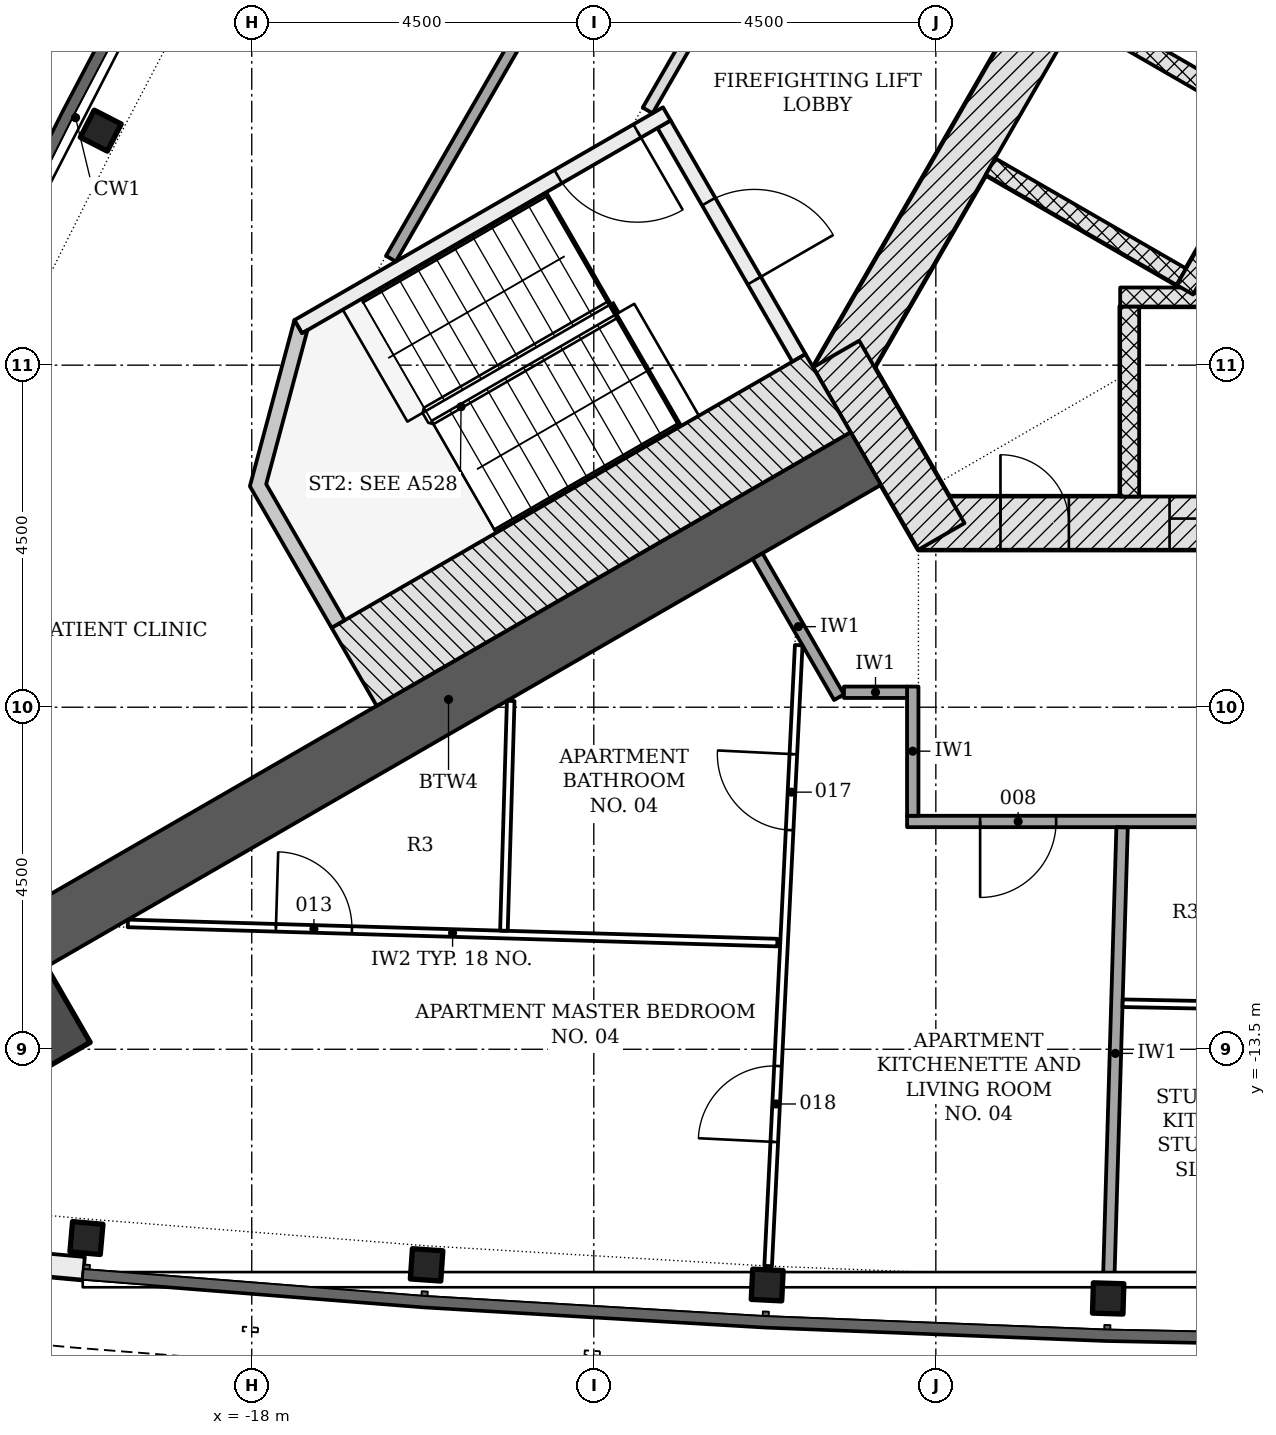
"""IFC4 building model, lengths in metres.
Left out: names, types, materials, properties, quantities, classifications, styles, units other than length and angle.
Written with IfcOpenShell. Run it as: python <this file> out.ifc"""

import sys

from ifc_helpers import new_model, si_unit, direction, frame, frame_2d, origin, origin_2d, place, context, subcontext, project, spatial, polyline, rectangle, i_section, outline, extrude, element, fill, save


model = new_model("IFC4")
c1 = context("Model", 3, precision=1e-05, world=origin(), true_north=direction((0.0, 1.0)))
c2 = subcontext(c1, "Body", "Model", "MODEL_VIEW")
j1 = project(units=[si_unit("LENGTHUNIT", "METRE"), si_unit("PLANEANGLEUNIT", "RADIAN")], contexts=[c1])
p1 = place(None, origin())
s1 = spatial("IfcSite", under=j1, at=p1, CompositionType="ELEMENT")
p2 = place(p1, origin())
s2 = spatial("IfcBuilding", under=s1, at=p2, CompositionType="ELEMENT")
p3 = place(p2, frame((0.0, 0.0, 91.5)))
s3 = spatial("IfcBuildingStorey", under=s2, at=p3, CompositionType="ELEMENT", Elevation=91.5)
p4 = place(p3, frame((-9.229, -6.578, -0.2), z_axis=(0.0, 0.0, 1.0), x_axis=(1.0, 0.0, 0.0)))
e1 = element("IfcWall", 1, at=p4, inside=s3, PredefinedType="SHEAR", context=c2, shape_type="SweptSolid", body=[
    extrude(rectangle(XDim=18.458, YDim=0.7, at=frame_2d((9.229, 0.0))), origin(), (0.0, 0.0, 1.0), 3.6),
])
p5 = place(p4, frame((3.304, 0.0, 0.2)))
e2 = element("IfcOpeningElement", 2, at=p5, cuts=e1, PredefinedType="OPENING", context=c2, shape_type="SweptSolid", body=[
    extrude(rectangle(XDim=1.1, YDim=2.1, at=frame_2d((0.55, 1.05))), frame((0.0, 0.36, 0.0), z_axis=(0.0, -1.0, 0.0), x_axis=(1.0, 0.0, 0.0)), (0.0, 0.0, 1.0), 0.72),
])
p6 = place(p4, frame((5.454, 0.0, 0.2)))
e3 = element("IfcOpeningElement", 3, at=p6, cuts=e1, PredefinedType="OPENING", context=c2, shape_type="SweptSolid", body=[
    extrude(rectangle(XDim=1.1, YDim=2.1, at=frame_2d((0.55, 1.05))), frame((0.0, 0.36, 0.0), z_axis=(0.0, -1.0, 0.0), x_axis=(1.0, 0.0, 0.0)), (0.0, 0.0, 1.0), 0.72),
])
p7 = place(p4, frame((7.604, 0.0, 0.2)))
e4 = element("IfcOpeningElement", 4, at=p7, cuts=e1, PredefinedType="OPENING", context=c2, shape_type="SweptSolid", body=[
    extrude(rectangle(XDim=1.1, YDim=2.1, at=frame_2d((0.55, 1.05))), frame((0.0, 0.36, 0.0), z_axis=(0.0, -1.0, 0.0), x_axis=(1.0, 0.0, 0.0)), (0.0, 0.0, 1.0), 0.72),
])
p8 = place(p4, frame((9.754, 0.0, 0.2)))
e5 = element("IfcOpeningElement", 5, at=p8, cuts=e1, PredefinedType="OPENING", context=c2, shape_type="SweptSolid", body=[
    extrude(rectangle(XDim=1.1, YDim=2.1, at=frame_2d((0.55, 1.05))), frame((0.0, 0.36, 0.0), z_axis=(0.0, -1.0, 0.0), x_axis=(1.0, 0.0, 0.0)), (0.0, 0.0, 1.0), 0.72),
])
p9 = place(p4, frame((11.904, 0.0, 0.2)))
e6 = element("IfcOpeningElement", 6, at=p9, cuts=e1, PredefinedType="OPENING", context=c2, shape_type="SweptSolid", body=[
    extrude(rectangle(XDim=1.1, YDim=2.1, at=frame_2d((0.55, 1.05))), frame((0.0, 0.36, 0.0), z_axis=(0.0, -1.0, 0.0), x_axis=(1.0, 0.0, 0.0)), (0.0, 0.0, 1.0), 0.72),
])
p10 = place(p4, frame((14.054, 0.0, 0.2)))
e7 = element("IfcOpeningElement", 7, at=p10, cuts=e1, PredefinedType="OPENING", context=c2, shape_type="SweptSolid", body=[
    extrude(rectangle(XDim=1.1, YDim=2.1, at=frame_2d((0.55, 1.05))), frame((0.0, 0.36, 0.0), z_axis=(0.0, -1.0, 0.0), x_axis=(1.0, 0.0, 0.0)), (0.0, 0.0, 1.0), 0.72),
])
p11 = place(p4, frame((1.079, 0.0, 0.2)))
e8 = element("IfcOpeningElement", 8, at=p11, cuts=e1, PredefinedType="OPENING", context=c2, shape_type="SweptSolid", body=[
    extrude(rectangle(XDim=0.9, YDim=2.1, at=frame_2d((0.45, 1.05))), frame((0.0, 0.36, 0.0), z_axis=(0.0, -1.0, 0.0), x_axis=(1.0, 0.0, 0.0)), (0.0, 0.0, 1.0), 0.72),
])
p12 = place(p3, frame((-1.083, 11.281, -0.2), z_axis=(0.0, 0.0, 1.0), x_axis=(-0.500001446645, -0.866024568562, 0.0)))
e9 = element("IfcWall", 9, at=p12, inside=s3, PredefinedType="SHEAR", context=c2, shape_type="SweptSolid", body=[
    extrude(rectangle(XDim=18.458, YDim=0.7, at=frame_2d((9.229, 0.0))), origin(), (0.0, 0.0, 1.0), 3.6),
])
p13 = place(p12, frame((8.979, 0.0, 0.2)))
e10 = element("IfcOpeningElement", 10, at=p13, cuts=e9, PredefinedType="OPENING", context=c2, shape_type="SweptSolid", body=[
    extrude(rectangle(XDim=1.2, YDim=2.1, at=frame_2d((0.6, 1.05))), frame((0.0, 0.36, 0.0), z_axis=(0.0, -1.0, 0.0), x_axis=(1.0, 0.0, 0.0)), (0.0, 0.0, 1.0), 0.72),
])
p14 = place(p12, frame((11.029, 0.0, 0.2)))
e11 = element("IfcOpeningElement", 11, at=p14, cuts=e9, PredefinedType="OPENING", context=c2, shape_type="SweptSolid", body=[
    extrude(rectangle(XDim=1.2, YDim=2.1, at=frame_2d((0.6, 1.05))), frame((0.0, 0.36, 0.0), z_axis=(0.0, -1.0, 0.0), x_axis=(1.0, 0.0, 0.0)), (0.0, 0.0, 1.0), 0.72),
])
p15 = place(p3, frame((-10.311, -4.353, -0.2), z_axis=(0.0, 0.0, 1.0), x_axis=(0.500042739161, -0.866000726912, 0.0)))
e12 = element("IfcWall", 12, at=p15, inside=s3, PredefinedType="SHEAR", context=c2, shape_type="SweptSolid", body=[
    extrude(rectangle(XDim=2.771, YDim=0.7, at=frame_2d((1.386, 0.0))), origin(), (0.0, 0.0, 1.0), 3.6),
])
p16 = place(p3, frame((-9.922, -5.728, -0.2), z_axis=(0.0, 0.0, 1.0), x_axis=(-0.866029086277, -0.499993621681, 0.0)))
e13 = element("IfcWall", 13, at=p16, inside=s3, PredefinedType="SHEAR", context=c2, shape_type="SweptSolid", body=[
    extrude(rectangle(XDim=12.677, YDim=0.8, at=frame_2d((6.339, 0.0))), origin(), (0.0, 0.0, 1.0), 3.6),
])
p17 = place(p3, frame((-22.243, -12.842, -0.2), z_axis=(0.0, 0.0, 1.0), x_axis=(-0.866025403784, -0.5, 0.0)))
e14 = element("IfcColumn", 14, at=p17, inside=s3, PredefinedType="COLUMN", context=c2, shape_type="SweptSolid", body=[
    extrude(rectangle(XDim=3.1, YDim=3.1, at=origin_2d()), origin(), (0.0, 0.0, 1.0), 3.6),
])
for number, where, z_axis, x_axis in (
    (15, (-19.986, -1.415, -0.2), (0.0, 0.0, 1.0), (-0.457, -0.89, 0.0)),
    (16, (-20.175, -15.983, -0.2), (0.0, 0.0, 1.0), (0.996, -0.088, 0.0)),
    (17, (-15.7, -16.336, -0.2), (0.0, 0.0, 1.0), (0.998, -0.069, 0.0)),
    (18, (-11.219, -16.601, -0.2), (0.0, 0.0, 1.0), (0.999, -0.049, 0.0)),
    (19, (-6.733, -16.778, -0.2), (0.0, 0.0, 1.0), (1.0, -0.03, 0.0)),
):
    element("IfcColumn", number, at=place(p3, frame(where, z_axis=z_axis, x_axis=x_axis)), inside=s3, PredefinedType="COLUMN", context=c2, shape_type="SweptSolid", body=[
        extrude(i_section(OverallWidth=0.401, OverallDepth=0.399, WebThickness=0.025, FlangeThickness=0.04, FilletRadius=0.015, at=origin_2d()), origin(), (0.0, 0.0, 1.0), 3.6),
    ])
p18 = place(p3, origin())
e20 = element("IfcWall", 20, at=p18, inside=s3, PredefinedType="NOTDEFINED", context=c2, shape_type="SweptSolid", body=[
    extrude(outline(polyline([(-24.428, -9.249), (-25.03, -10.553), (-25.4, -12.077), (-25.177, -13.63), (-24.392, -14.989), (-23.159, -15.958), (-21.654, -16.4), (-20.224, -16.531), (-20.196, -16.232), (-21.597, -16.104), (-23.019, -15.687), (-24.161, -14.789), (-24.888, -13.53), (-25.094, -12.092), (-24.745, -10.652), (-24.156, -9.374), (-24.428, -9.249)])), origin(), (0.0, 0.0, 1.0), 3.3),
])
p19 = place(p3, frame((-6.45, -6.228, -0.2), z_axis=(0.0, 0.0, 1.0), x_axis=(0.0, 1.0, 0.0)))
e21 = element("IfcWall", 21, at=p19, inside=s3, PredefinedType="PARTITIONING", context=c2, shape_type="SweptSolid", body=[
    extrude(rectangle(XDim=2.5, YDim=0.25, at=frame_2d((1.25, 0.0))), origin(), (0.0, 0.0, 1.0), 3.6),
])
p20 = place(p3, frame((-6.575, -3.603, 0.0), z_axis=(0.0, 0.0, 1.0), x_axis=(1.0, 0.0, 0.0)))
e22 = element("IfcWall", 22, at=p20, inside=s3, PredefinedType="PARTITIONING", context=c2, shape_type="SweptSolid", body=[
    extrude(rectangle(XDim=13.15, YDim=0.25, at=frame_2d((6.575, 0.0))), origin(), (0.0, 0.0, 1.0), 3.4),
])
for number, where, z_axis, x_axis in (
    (23, (-7.106, 0.148, -0.2), (0.0, 0.0, 1.0), (0.866, -0.5, 0.0)),
    (24, (-8.281, -1.887, -0.2), (0.0, 0.0, 1.0), (0.866, -0.5, 0.0)),
):
    element("IfcWall", number, at=place(p3, frame(where, z_axis=z_axis, x_axis=x_axis)), inside=s3, PredefinedType="PARTITIONING", context=c2, shape_type="SweptSolid", body=[
        extrude(rectangle(XDim=2.9, YDim=0.25, at=frame_2d((1.45, 0.0))), origin(), (0.0, 0.0, 1.0), 3.6),
    ])
p21 = place(p3, frame((0.176, 6.711, 0.0), z_axis=(0.0, 0.0, 1.0), x_axis=(-0.500004227369, -0.866022963098, 0.0)))
e25 = element("IfcWall", 25, at=p21, inside=s3, PredefinedType="PARTITIONING", context=c2, shape_type="SweptSolid", body=[
    extrude(rectangle(XDim=11.8, YDim=0.25, at=frame_2d((5.9, 0.0))), origin(), (0.0, 0.0, 1.0), 3.4),
])
p22 = place(p3, frame((-12.576, -1.331, -0.2), z_axis=(0.0, 0.0, 1.0), x_axis=(0.499970499736, -0.8660424351, 0.0)))
e26 = element("IfcWall", 26, at=p22, inside=s3, PredefinedType="SHEAR", context=c2, shape_type="SweptSolid", body=[
    extrude(rectangle(XDim=3.55, YDim=0.2, at=frame_2d((1.775, 0.0))), origin(), (0.0, 0.0, 1.0), 3.6),
])
p23 = place(p22, frame((1.175, 0.0, 0.2)))
e27 = element("IfcOpeningElement", 27, at=p23, cuts=e26, PredefinedType="OPENING", context=c2, shape_type="SweptSolid", body=[
    extrude(rectangle(XDim=1.2, YDim=2.1, at=frame_2d((0.6, 1.05))), frame((0.0, 0.11, 0.0), z_axis=(0.0, -1.0, 0.0), x_axis=(1.0, 0.0, 0.0)), (0.0, 0.0, 1.0), 0.22),
])
p24 = place(p3, frame((-12.539, -1.194, -0.2), z_axis=(0.0, 0.0, 1.0), x_axis=(-0.866045472092, -0.499965239061, 0.0)))
e28 = element("IfcWall", 28, at=p24, inside=s3, PredefinedType="SHEAR", context=c2, shape_type="SweptSolid", body=[
    extrude(rectangle(XDim=5.6, YDim=0.2, at=frame_2d((2.8, 0.0))), origin(), (0.0, 0.0, 1.0), 3.6),
])
p25 = place(p24, frame((0.45, 0.0, 0.2)))
e29 = element("IfcOpeningElement", 29, at=p25, cuts=e28, PredefinedType="OPENING", context=c2, shape_type="SweptSolid", body=[
    extrude(rectangle(XDim=1.2, YDim=2.1, at=frame_2d((0.6, 1.05))), frame((0.0, 0.11, 0.0), z_axis=(0.0, -1.0, 0.0), x_axis=(1.0, 0.0, 0.0)), (0.0, 0.0, 1.0), 0.22),
])
p26 = place(p3, frame((-10.418, -4.868, -0.2), z_axis=(0.0, 0.0, 1.0), x_axis=(-0.866018442252, -0.500012057535, 0.0)))
e30 = element("IfcWall", 30, at=p26, inside=s3, PredefinedType="SHEAR", context=c2, shape_type="SweptSolid", body=[
    extrude(rectangle(XDim=7.2, YDim=1.186, at=frame_2d((3.6, 0.0))), origin(), (0.0, 0.0, 1.0), 3.6),
])
p27 = place(p3, frame((0.0, 0.0, -0.2)))
e31 = element("IfcWall", 31, at=p27, inside=s3, PredefinedType="SHEAR", context=c2, shape_type="SweptSolid", body=[
    extrude(outline(polyline([(-17.439, -3.907), (-18.025, -6.093), (-16.95, -7.955), (-16.777, -7.855), (-17.81, -6.065), (-17.267, -4.039), (-17.339, -4.081), (-17.339, -4.081), (-17.339, -4.081), (-17.339, -4.081), (-17.339, -4.081), (-17.339, -4.081), (-17.339, -4.081), (-17.339, -4.081), (-17.339, -4.081), (-17.339, -4.081), (-17.339, -4.081), (-17.339, -4.081), (-17.339, -4.081), (-17.339, -4.081), (-17.339, -4.081), (-17.339, -4.081), (-17.339, -4.081), (-17.439, -3.907)])), origin(), (0.0, 0.0, 1.0), 3.6),
])
p28 = place(p3, frame((-16.169, -3.099, 0.0), z_axis=(0.0, 0.0, 1.0), x_axis=(0.499999805269, 0.866025516212, 0.0)))
e32 = element("IfcWall", 32, at=p28, inside=s3, PredefinedType="PARTITIONING", context=c2, shape_type="SweptSolid", body=[
    extrude(rectangle(XDim=22.097, YDim=0.15, at=frame_2d((11.049, 0.0))), origin(), (0.0, 0.0, 1.0), 2.778),
])
p29 = place(p28, frame((12.221, 0.0, 0.0)))
e33 = element("IfcOpeningElement", 33, at=p29, cuts=e32, PredefinedType="OPENING", context=c2, shape_type="SweptSolid", body=[
    extrude(rectangle(XDim=1.5, YDim=2.1, at=frame_2d((0.75, 1.05))), frame((0.0, 0.085, 0.0), z_axis=(0.0, -1.0, 0.0), x_axis=(1.0, 0.0, 0.0)), (0.0, 0.0, 1.0), 0.17),
])
p30 = place(p28, frame((3.403, 0.0, 0.0)))
e34 = element("IfcOpeningElement", 34, at=p30, cuts=e32, PredefinedType="OPENING", context=c2, shape_type="SweptSolid", body=[
    extrude(rectangle(XDim=1.5, YDim=2.1, at=frame_2d((0.75, 1.05))), frame((0.0, 0.085, 0.0), z_axis=(0.0, -1.0, 0.0), x_axis=(1.0, 0.0, 0.0)), (0.0, 0.0, 1.0), 0.17),
])
p31 = place(p3, frame((-4.407, 13.374, 0.0), z_axis=(0.0, 0.0, 1.0), x_axis=(-0.499997181693, -0.866027030928, 0.0)))
e35 = element("IfcWall", 35, at=p31, inside=s3, PredefinedType="PARTITIONING", context=c2, shape_type="SweptSolid", body=[
    extrude(rectangle(XDim=16.77, YDim=0.15, at=frame_2d((8.385, 0.0))), origin(), (0.0, 0.0, 1.0), 2.778),
])
p32 = place(p31, frame((8.879, 0.0, 0.0)))
e36 = element("IfcOpeningElement", 36, at=p32, cuts=e35, PredefinedType="OPENING", context=c2, shape_type="SweptSolid", body=[
    extrude(rectangle(XDim=1.0, YDim=2.1, at=frame_2d((0.5, 1.05))), frame((0.0, 0.085, 0.0), z_axis=(0.0, -1.0, 0.0), x_axis=(1.0, 0.0, 0.0)), (0.0, 0.0, 1.0), 0.17),
])
p33 = place(p3, frame((3.689, -10.503, 0.0), z_axis=(0.0, 0.0, 1.0), x_axis=(-1.0, 0.0, 0.0)))
e37 = element("IfcWall", 37, at=p33, inside=s3, PredefinedType="PARTITIONING", context=c2, shape_type="SweptSolid", body=[
    extrude(rectangle(XDim=13.068, YDim=0.15, at=frame_2d((6.534, 0.0))), origin(), (0.0, 0.0, 1.0), 2.778),
])
p34 = place(p33, frame((11.106, 0.0, 0.0)))
e38 = element("IfcOpeningElement", 38, at=p34, cuts=e37, PredefinedType="OPENING", context=c2, shape_type="SweptSolid", body=[
    extrude(rectangle(XDim=1.0, YDim=2.1, at=frame_2d((0.5, 1.05))), frame((0.0, 0.085, 0.0), z_axis=(0.0, -1.0, 0.0), x_axis=(1.0, 0.0, 0.0)), (0.0, 0.0, 1.0), 0.17),
])
p35 = place(p33, frame((6.359, 0.0, 0.0)))
e39 = element("IfcOpeningElement", 39, at=p35, cuts=e37, PredefinedType="OPENING", context=c2, shape_type="SweptSolid", body=[
    extrude(rectangle(XDim=1.0, YDim=2.1, at=frame_2d((0.5, 1.05))), frame((0.0, 0.085, 0.0), z_axis=(0.0, -1.0, 0.0), x_axis=(1.0, 0.0, 0.0)), (0.0, 0.0, 1.0), 0.17),
])
p36 = place(p33, frame((2.501, 0.0, 0.0)))
e40 = element("IfcOpeningElement", 40, at=p36, cuts=e37, PredefinedType="OPENING", context=c2, shape_type="SweptSolid", body=[
    extrude(rectangle(XDim=1.0, YDim=2.1, at=frame_2d((0.5, 1.05))), frame((0.0, 0.085, 0.0), z_axis=(0.0, -1.0, 0.0), x_axis=(1.0, 0.0, 0.0)), (0.0, 0.0, 1.0), 0.17),
])
p37 = place(p3, frame((-11.345, -7.012, 0.0), z_axis=(0.0, 0.0, 1.0), x_axis=(0.499998569178, -0.866026229868, 0.0)))
e41 = element("IfcWall", 41, at=p37, inside=s3, PredefinedType="PARTITIONING", context=c2, shape_type="SweptSolid", body=[
    extrude(rectangle(XDim=2.143, YDim=0.15, at=frame_2d((1.072, 0.0))), origin(), (0.0, 0.0, 1.0), 2.778),
])
p38 = place(p3, frame((-9.304, -10.428, 0.0), z_axis=(0.0, 0.0, 1.0), x_axis=(0.0, 1.0, 0.0)))
e42 = element("IfcWall", 42, at=p38, inside=s3, PredefinedType="PARTITIONING", context=c2, shape_type="SweptSolid", body=[
    extrude(rectangle(XDim=1.7, YDim=0.15, at=frame_2d((0.85, 0.0))), origin(), (0.0, 0.0, 1.0), 3.4),
])
p39 = place(p3, frame((-10.209, -8.803, 0.0), z_axis=(0.0, 0.0, 1.0), x_axis=(1.0, 0.0, 0.0)))
e43 = element("IfcWall", 43, at=p39, inside=s3, PredefinedType="PARTITIONING", context=c2, shape_type="SweptSolid", body=[
    extrude(rectangle(XDim=0.83, YDim=0.15, at=frame_2d((0.415, 0.0))), origin(), (0.0, 0.0, 1.0), 3.4),
])
p40 = place(p3, frame((-6.725, -16.528, 0.0), z_axis=(0.0, 0.0, 1.0), x_axis=(0.029499121441, 0.99956480622, 0.0)))
e44 = element("IfcWall", 44, at=p40, inside=s3, PredefinedType="PARTITIONING", context=c2, shape_type="SweptSolid", body=[
    extrude(rectangle(XDim=5.951, YDim=0.15, at=frame_2d((2.975, 0.0))), origin(), (0.0, 0.0, 1.0), 2.778),
])
p41 = place(p3, frame((-19.63, -11.844, 0.0), z_axis=(0.0, 0.0, 1.0), x_axis=(0.999564712957, -0.02950228145, 0.0)))
e45 = element("IfcWall", 45, at=p41, inside=s3, PredefinedType="PARTITIONING", context=c2, shape_type="SweptSolid", body=[
    extrude(rectangle(XDim=8.548, YDim=0.1, at=frame_2d((4.274, 0.0))), origin(), (0.0, 0.0, 1.0), 2.778),
])
p42 = place(p41, frame((1.949, 0.0, 0.0)))
e46 = element("IfcOpeningElement", 46, at=p42, cuts=e45, PredefinedType="OPENING", context=c2, shape_type="SweptSolid", body=[
    extrude(rectangle(XDim=1.0, YDim=2.1, at=frame_2d((0.5, 1.05))), frame((0.0, 0.06, 0.0), z_axis=(0.0, -1.0, 0.0), x_axis=(1.0, 0.0, 0.0)), (0.0, 0.0, 1.0), 0.12),
])
p43 = place(p3, frame((-11.206, -16.352, 0.0), z_axis=(0.0, 0.0, 1.0), x_axis=(0.049170759729, 0.998790386612, 0.0)))
e47 = element("IfcWall", 47, at=p43, inside=s3, PredefinedType="PARTITIONING", context=c2, shape_type="SweptSolid", body=[
    extrude(rectangle(XDim=8.178, YDim=0.1, at=frame_2d((4.089, 0.0))), origin(), (0.0, 0.0, 1.0), 2.778),
])
p44 = place(p43, frame((5.742, 0.0, 0.0)))
e48 = element("IfcOpeningElement", 48, at=p44, cuts=e47, PredefinedType="OPENING", context=c2, shape_type="SweptSolid", body=[
    extrude(rectangle(XDim=1.0, YDim=2.1, at=frame_2d((0.5, 1.05))), frame((0.0, 0.06, 0.0), z_axis=(0.0, -1.0, 0.0), x_axis=(1.0, 0.0, 0.0)), (0.0, 0.0, 1.0), 0.12),
])
p45 = place(p43, frame((1.635, 0.0, 0.0)))
e49 = element("IfcOpeningElement", 49, at=p45, cuts=e47, PredefinedType="OPENING", context=c2, shape_type="SweptSolid", body=[
    extrude(rectangle(XDim=1.0, YDim=2.1, at=frame_2d((0.5, 1.05))), frame((0.0, 0.06, 0.0), z_axis=(0.0, -1.0, 0.0), x_axis=(1.0, 0.0, 0.0)), (0.0, 0.0, 1.0), 0.12),
])
p46 = place(p3, frame((-14.682, -11.94, 0.0), z_axis=(0.0, 0.0, 1.0), x_axis=(0.029546132361, 0.999563417729, 0.0)))
e50 = element("IfcWall", 50, at=p46, inside=s3, PredefinedType="PARTITIONING", context=c2, shape_type="SweptSolid", body=[
    extrude(rectangle(XDim=3.024, YDim=0.1, at=frame_2d((1.512, 0.0))), origin(), (0.0, 0.0, 1.0), 3.4),
])
p47 = place(p3, frame((-6.542, -12.894, 0.0), z_axis=(0.0, 0.0, 1.0), x_axis=(0.999805392652, -0.019727565082, 0.0)))
e51 = element("IfcWall", 51, at=p47, inside=s3, PredefinedType="PARTITIONING", context=c2, shape_type="SweptSolid", body=[
    extrude(rectangle(XDim=2.364, YDim=0.1, at=frame_2d((1.182, 0.0))), origin(), (0.0, 0.0, 1.0), 2.778),
])
p48 = place(p5, origin())
e52 = element("IfcDoor", 52, at=p48, inside=s3, OperationType="DOUBLE_DOOR_SLIDING", PredefinedType="DOOR", context=c2, shape_type="SweptSolid", body=[
    extrude(rectangle(XDim=1.1, YDim=2.1, at=frame_2d((0.55, 1.05))), frame((0.0, 0.025, 0.0), z_axis=(0.0, -1.0, 0.0), x_axis=(1.0, 0.0, 0.0)), (0.0, 0.0, 1.0), 0.05),
])
fill(e2, e52)
p49 = place(p11, origin())
e53 = element("IfcDoor", 53, at=p49, inside=s3, OperationType="SINGLE_SWING_LEFT", PredefinedType="DOOR", context=c2, shape_type="SweptSolid", body=[
    extrude(rectangle(XDim=0.9, YDim=2.1, at=frame_2d((0.45, 1.05))), frame((0.0, 0.075, 0.0), z_axis=(0.0, -1.0, 0.0), x_axis=(1.0, 0.0, 0.0)), (0.0, 0.0, 1.0), 0.15),
])
fill(e8, e53)
p50 = place(p23, origin())
e54 = element("IfcDoor", 54, at=p50, inside=s3, OperationType="SINGLE_SWING_RIGHT", PredefinedType="DOOR", context=c2, shape_type="SweptSolid", body=[
    extrude(rectangle(XDim=1.2, YDim=2.1, at=frame_2d((0.6, 1.05))), frame((0.0, 0.025, 0.0), z_axis=(0.0, -1.0, 0.0), x_axis=(1.0, 0.0, 0.0)), (0.0, 0.0, 1.0), 0.05),
])
fill(e27, e54)
p51 = place(p25, origin())
e55 = element("IfcDoor", 55, at=p51, inside=s3, OperationType="SINGLE_SWING_LEFT", PredefinedType="DOOR", context=c2, shape_type="SweptSolid", body=[
    extrude(rectangle(XDim=1.2, YDim=2.1, at=frame_2d((0.6, 1.05))), frame((0.0, 0.025, 0.0), z_axis=(0.0, -1.0, 0.0), x_axis=(1.0, 0.0, 0.0)), (0.0, 0.0, 1.0), 0.05),
])
fill(e29, e55)
p52 = place(p34, origin())
e56 = element("IfcDoor", 56, at=p52, inside=s3, OperationType="SINGLE_SWING_RIGHT", PredefinedType="DOOR", context=c2, shape_type="SweptSolid", body=[
    extrude(rectangle(XDim=1.0, YDim=2.1, at=frame_2d((0.5, 1.05))), frame((0.0, 0.025, 0.0), z_axis=(0.0, -1.0, 0.0), x_axis=(1.0, 0.0, 0.0)), (0.0, 0.0, 1.0), 0.05),
])
fill(e38, e56)
p53 = place(p42, origin())
e57 = element("IfcDoor", 57, at=p53, inside=s3, OperationType="SINGLE_SWING_LEFT", PredefinedType="DOOR", context=c2, shape_type="SweptSolid", body=[
    extrude(rectangle(XDim=1.0, YDim=2.1, at=frame_2d((0.5, 1.05))), frame((0.0, 0.025, 0.0), z_axis=(0.0, -1.0, 0.0), x_axis=(1.0, 0.0, 0.0)), (0.0, 0.0, 1.0), 0.05),
])
fill(e46, e57)
p54 = place(p44, origin())
e58 = element("IfcDoor", 58, at=p54, inside=s3, OperationType="SINGLE_SWING_RIGHT", PredefinedType="DOOR", context=c2, shape_type="SweptSolid", body=[
    extrude(rectangle(XDim=1.0, YDim=2.1, at=frame_2d((0.5, 1.05))), frame((0.0, 0.025, 0.0), z_axis=(0.0, -1.0, 0.0), x_axis=(1.0, 0.0, 0.0)), (0.0, 0.0, 1.0), 0.05),
])
fill(e48, e58)
p55 = place(p45, origin())
e59 = element("IfcDoor", 59, at=p55, inside=s3, OperationType="SINGLE_SWING_LEFT", PredefinedType="DOOR", context=c2, shape_type="SweptSolid", body=[
    extrude(rectangle(XDim=1.0, YDim=2.1, at=frame_2d((0.5, 1.05))), frame((0.0, 0.025, 0.0), z_axis=(0.0, -1.0, 0.0), x_axis=(1.0, 0.0, 0.0)), (0.0, 0.0, 1.0), 0.05),
])
fill(e49, e59)
save(model, sys.argv[1])
